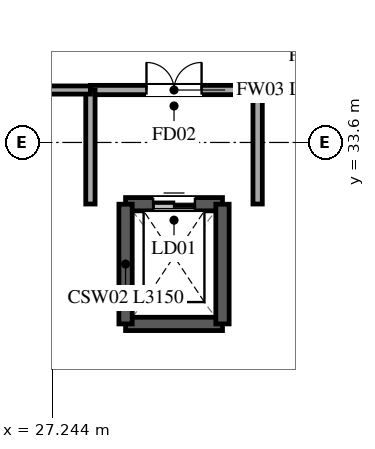
"""IFC4 building model, lengths in metres.
Left out: names, types, materials, properties, quantities, classifications, styles, units other than length and angle.
Written with IfcOpenShell. Run it as: python <this file> out.ifc"""

import sys

from ifc_helpers import new_model, si_unit, direction, frame, frame_2d, origin, place, context, subcontext, project, spatial, rectangle, extrude, element, fill, save


model = new_model("IFC4")
c1 = context("Model", 3, precision=1e-05, world=origin(), true_north=direction((0.0, 1.0)))
c2 = subcontext(c1, "Body", "Model", "MODEL_VIEW")
j1 = project(units=[si_unit("LENGTHUNIT", "METRE"), si_unit("PLANEANGLEUNIT", "RADIAN")], contexts=[c1])
p1 = place(None, origin())
s1 = spatial("IfcSite", under=j1, at=p1, CompositionType="ELEMENT")
p2 = place(p1, origin())
s2 = spatial("IfcBuilding", under=s1, at=p2, CompositionType="ELEMENT")
p3 = place(p2, frame((0.0, 0.0, -9.6)))
s3 = spatial("IfcBuildingStorey", under=s2, at=p3, CompositionType="ELEMENT", Elevation=-9.6)
p4 = place(p3, frame((29.175, 31.975, 0.0), z_axis=(0.0, 0.0, 1.0), x_axis=(1.0, 0.0, 0.0)))
e1 = element("IfcWall", 1, at=p4, inside=s3, PredefinedType="SHEAR", context=c2, shape_type="SweptSolid", body=[
    extrude(rectangle(XDim=2.55, YDim=0.35, at=frame_2d((1.275, 0.0))), origin(), (0.0, 0.0, 1.0), 4.8),
])
p5 = place(p4, frame((0.725, 0.0, 0.0)))
e2 = element("IfcOpeningElement", 2, at=p5, cuts=e1, PredefinedType="OPENING", context=c2, shape_type="SweptSolid", body=[
    extrude(rectangle(XDim=1.1, YDim=2.2, at=frame_2d((0.55, 1.1))), frame((0.0, 0.185, 0.0), z_axis=(0.0, -1.0, 0.0), x_axis=(1.0, 0.0, 0.0)), (0.0, 0.0, 1.0), 0.37),
])
p6 = place(p3, frame((31.725, 28.825, 0.0), z_axis=(0.0, 0.0, 1.0), x_axis=(-1.0, 0.0, 0.0)))
e3 = element("IfcWall", 3, at=p6, inside=s3, PredefinedType="SHEAR", context=c2, shape_type="SweptSolid", body=[
    extrude(rectangle(XDim=2.55, YDim=0.35, at=frame_2d((1.275, 0.0))), origin(), (0.0, 0.0, 1.0), 4.8),
])
for number, where, z_axis, x_axis in (
    (4, (29.175, 28.825, 0.0), (0.0, 0.0, 1.0), (0.0, 1.0, 0.0)),
    (5, (31.725, 31.975, 0.0), (0.0, 0.0, 1.0), (0.0, -1.0, 0.0)),
):
    element("IfcWall", number, at=place(p3, frame(where, z_axis=z_axis, x_axis=x_axis)), inside=s3, PredefinedType="SHEAR", context=c2, shape_type="SweptSolid", body=[
        extrude(rectangle(XDim=3.15, YDim=0.35, at=frame_2d((1.575, 0.0))), origin(), (0.0, 0.0, 1.0), 4.8),
    ])
p7 = place(p3, frame((28.25, 34.98, 0.0), z_axis=(0.0, 0.0, 1.0), x_axis=(1.0, 0.0, 0.0)))
e6 = element("IfcWall", 6, at=p7, inside=s3, PredefinedType="STANDARD", context=c2, shape_type="SweptSolid", body=[
    extrude(rectangle(XDim=4.4, YDim=0.245, at=frame_2d((2.2, 0.0))), origin(), (0.0, 0.0, 1.0), 4.45),
])
p8 = place(p7, frame((1.475, 0.0, 0.0)))
e7 = element("IfcOpeningElement", 7, at=p8, cuts=e6, PredefinedType="OPENING", context=c2, shape_type="SweptSolid", body=[
    extrude(rectangle(XDim=1.45, YDim=2.2, at=frame_2d((0.725, 1.1))), frame((0.0, 0.133, 0.0), z_axis=(0.0, -1.0, 0.0), x_axis=(1.0, 0.0, 0.0)), (0.0, 0.0, 1.0), 0.265),
])
for number, where, z_axis, x_axis in (
    (8, (28.25, 31.98, 0.0), (0.0, 0.0, 1.0), (0.0, 1.0, 0.0)),
    (9, (32.65, 34.98, 0.0), (0.0, 0.0, 1.0), (0.0, -1.0, 0.0)),
):
    element("IfcWall", number, at=place(p3, frame(where, z_axis=z_axis, x_axis=x_axis)), inside=s3, PredefinedType="STANDARD", context=c2, shape_type="SweptSolid", body=[
        extrude(rectangle(XDim=3.0, YDim=0.245, at=frame_2d((1.5, 0.0))), origin(), (0.0, 0.0, 1.0), 3.67),
    ])
p9 = place(p3, frame((28.25, 34.98, 0.0), z_axis=(0.0, 0.0, 1.0), x_axis=(-1.0, 0.0, 0.0)))
e10 = element("IfcWall", 10, at=p9, inside=s3, PredefinedType="PARTITIONING", context=c2, shape_type="SweptSolid", body=[
    extrude(rectangle(XDim=22.655, YDim=0.215, at=frame_2d((11.328, 0.0))), origin(), (0.0, 0.0, 1.0), 3.67),
])
p10 = place(p9, frame((12.002, 0.0, 0.0)))
e11 = element("IfcOpeningElement", 11, at=p10, cuts=e10, PredefinedType="OPENING", context=c2, shape_type="SweptSolid", body=[
    extrude(rectangle(XDim=1.35, YDim=2.2, at=frame_2d((0.675, 1.1))), frame((0.0, 0.118, 0.0), z_axis=(0.0, -1.0, 0.0), x_axis=(1.0, 0.0, 0.0)), (0.0, 0.0, 1.0), 0.235),
])
p11 = place(p3, frame((44.6, 34.98, 0.0), z_axis=(0.0, 0.0, 1.0), x_axis=(-1.0, 0.0, 0.0)))
e12 = element("IfcWall", 12, at=p11, inside=s3, PredefinedType="PARTITIONING", context=c2, shape_type="SweptSolid", body=[
    extrude(rectangle(XDim=11.95, YDim=0.215, at=frame_2d((5.975, 0.0))), origin(), (0.0, 0.0, 1.0), 3.67),
])
p12 = place(p5, origin())
e13 = element("IfcDoor", 13, at=p12, inside=s3, OperationType="DOUBLE_DOOR_SLIDING", PredefinedType="DOOR", context=c2, shape_type="SweptSolid", body=[
    extrude(rectangle(XDim=1.1, YDim=2.2, at=frame_2d((0.55, 1.1))), frame((0.0, 0.025, 0.0), z_axis=(0.0, -1.0, 0.0), x_axis=(1.0, 0.0, 0.0)), (0.0, 0.0, 1.0), 0.05),
])
fill(e2, e13)
p13 = place(p8, origin())
e14 = element("IfcDoor", 14, at=p13, inside=s3, OperationType="DOUBLE_DOOR_SINGLE_SWING", PredefinedType="DOOR", context=c2, shape_type="SweptSolid", body=[
    extrude(rectangle(XDim=1.45, YDim=2.2, at=frame_2d((0.725, 1.1))), frame((0.0, 0.025, 0.0), z_axis=(0.0, -1.0, 0.0), x_axis=(1.0, 0.0, 0.0)), (0.0, 0.0, 1.0), 0.05),
])
fill(e7, e14)
save(model, sys.argv[1])
